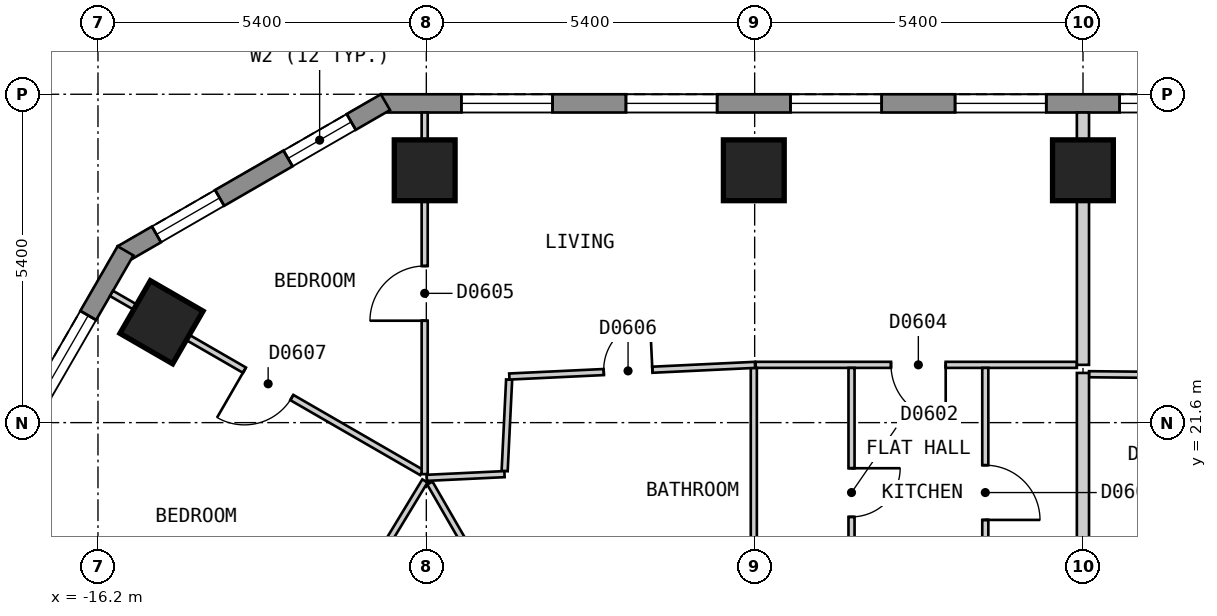
"""IFC4 building model, lengths in metres.
Left out: names, types, materials, properties, quantities, classifications, styles, units other than length and angle.
Written with IfcOpenShell. Run it as: python <this file> out.ifc"""

import sys

from ifc_helpers import new_model, si_unit, direction, frame, frame_2d, origin, origin_2d, place, context, subcontext, project, spatial, polyline, rectangle, outline, extrude, element, fill, save


model = new_model("IFC4")
c1 = context("Model", 3, precision=1e-05, world=origin(), true_north=direction((0.0, 1.0)))
c2 = subcontext(c1, "Body", "Model", "MODEL_VIEW")
j1 = project(units=[si_unit("LENGTHUNIT", "METRE"), si_unit("PLANEANGLEUNIT", "RADIAN")], contexts=[c1])
p1 = place(None, origin())
s1 = spatial("IfcSite", under=j1, at=p1, CompositionType="ELEMENT")
p2 = place(p1, origin())
s2 = spatial("IfcBuilding", under=s1, at=p2, CompositionType="ELEMENT")
p3 = place(p2, frame((0.0, 0.0, 81.0)))
s3 = spatial("IfcBuildingStorey", under=s2, at=p3, CompositionType="ELEMENT", Elevation=81.0)
for number, where, z_axis, x_axis in (
    (1, (-0.001, 25.75, 0.0), (0.0, 0.0, 1.0), (-1.0, 0.0, 0.0)),
    (2, (-5.414, 25.75, 0.0), (0.0, 0.0, 1.0), (-1.0, 0.0, 0.0)),
    (3, (-10.827, 25.75, 0.0), (0.0, 0.0, 1.0), (-1.0, 0.0, 0.0)),
    (4, (-15.155, 23.251, 0.0), (0.0, 0.0, 1.0), (-0.5, -0.866, 0.0)),
):
    element("IfcColumn", number, at=place(p3, frame(where, z_axis=z_axis, x_axis=x_axis)), inside=s3, PredefinedType="COLUMN", context=c2, shape_type="SweptSolid", body=[
        extrude(rectangle(XDim=1.0, YDim=1.0, at=origin_2d()), origin(), (0.0, 0.0, 1.0), 3.0),
    ])
p4 = place(p3, frame((11.547, 26.85, 0.0), z_axis=(0.0, 0.0, 1.0), x_axis=(-1.0, 0.0, 0.0)))
e5 = element("IfcWall", 5, at=p4, inside=s3, PredefinedType="SOLIDWALL", context=c2, shape_type="SweptSolid", body=[
    extrude(outline(polyline([(0.0, -0.15), (23.094, -0.15), (23.014, 0.15), (0.08, 0.15), (0.0, -0.15)])), origin(), (0.0, 0.0, 1.0), 2.7),
])
p5 = place(p4, frame((1.325, 0.0, 0.15)))
e6 = element("IfcOpeningElement", 6, at=p5, cuts=e5, PredefinedType="OPENING", context=c2, shape_type="SweptSolid", body=[
    extrude(rectangle(XDim=1.5, YDim=2.1, at=frame_2d((0.75, 1.05))), frame((0.0, 0.16, 0.0), z_axis=(0.0, -1.0, 0.0), x_axis=(1.0, 0.0, 0.0)), (0.0, 0.0, 1.0), 0.32),
])
p6 = place(p4, frame((4.032, 0.0, 0.15)))
e7 = element("IfcOpeningElement", 7, at=p6, cuts=e5, PredefinedType="OPENING", context=c2, shape_type="SweptSolid", body=[
    extrude(rectangle(XDim=1.5, YDim=2.1, at=frame_2d((0.75, 1.05))), frame((0.0, 0.16, 0.0), z_axis=(0.0, -1.0, 0.0), x_axis=(1.0, 0.0, 0.0)), (0.0, 0.0, 1.0), 0.32),
])
p7 = place(p4, frame((6.738, 0.0, 0.15)))
e8 = element("IfcOpeningElement", 8, at=p7, cuts=e5, PredefinedType="OPENING", context=c2, shape_type="SweptSolid", body=[
    extrude(rectangle(XDim=1.5, YDim=2.1, at=frame_2d((0.75, 1.05))), frame((0.0, 0.16, 0.0), z_axis=(0.0, -1.0, 0.0), x_axis=(1.0, 0.0, 0.0)), (0.0, 0.0, 1.0), 0.32),
])
p8 = place(p4, frame((9.445, 0.0, 0.15)))
e9 = element("IfcOpeningElement", 9, at=p8, cuts=e5, PredefinedType="OPENING", context=c2, shape_type="SweptSolid", body=[
    extrude(rectangle(XDim=1.5, YDim=2.1, at=frame_2d((0.75, 1.05))), frame((0.0, 0.16, 0.0), z_axis=(0.0, -1.0, 0.0), x_axis=(1.0, 0.0, 0.0)), (0.0, 0.0, 1.0), 0.32),
])
p9 = place(p4, frame((12.151, 0.0, 0.15)))
e10 = element("IfcOpeningElement", 10, at=p9, cuts=e5, PredefinedType="OPENING", context=c2, shape_type="SweptSolid", body=[
    extrude(rectangle(XDim=1.5, YDim=2.1, at=frame_2d((0.75, 1.05))), frame((0.0, 0.16, 0.0), z_axis=(0.0, -1.0, 0.0), x_axis=(1.0, 0.0, 0.0)), (0.0, 0.0, 1.0), 0.32),
])
p10 = place(p4, frame((14.858, 0.0, 0.15)))
e11 = element("IfcOpeningElement", 11, at=p10, cuts=e5, PredefinedType="OPENING", context=c2, shape_type="SweptSolid", body=[
    extrude(rectangle(XDim=1.5, YDim=2.1, at=frame_2d((0.75, 1.05))), frame((0.0, 0.16, 0.0), z_axis=(0.0, -1.0, 0.0), x_axis=(1.0, 0.0, 0.0)), (0.0, 0.0, 1.0), 0.32),
])
p11 = place(p4, frame((17.564, 0.0, 0.15)))
e12 = element("IfcOpeningElement", 12, at=p11, cuts=e5, PredefinedType="OPENING", context=c2, shape_type="SweptSolid", body=[
    extrude(rectangle(XDim=1.5, YDim=2.1, at=frame_2d((0.75, 1.05))), frame((0.0, 0.16, 0.0), z_axis=(0.0, -1.0, 0.0), x_axis=(1.0, 0.0, 0.0)), (0.0, 0.0, 1.0), 0.32),
])
p12 = place(p4, frame((20.271, 0.0, 0.15)))
e13 = element("IfcOpeningElement", 13, at=p12, cuts=e5, PredefinedType="OPENING", context=c2, shape_type="SweptSolid", body=[
    extrude(rectangle(XDim=1.5, YDim=2.1, at=frame_2d((0.75, 1.05))), frame((0.0, 0.16, 0.0), z_axis=(0.0, -1.0, 0.0), x_axis=(1.0, 0.0, 0.0)), (0.0, 0.0, 1.0), 0.32),
])
p13 = place(p3, frame((-11.472, 26.87, 0.0), z_axis=(0.0, 0.0, 1.0), x_axis=(-0.866022959057, -0.500004234368, 0.0)))
e14 = element("IfcWall", 14, at=p13, inside=s3, PredefinedType="SOLIDWALL", context=c2, shape_type="SweptSolid", body=[
    extrude(outline(polyline([(0.0, -0.15), (5.0, -0.15), (4.92, 0.15), (0.08, 0.15), (0.0, -0.15)])), origin(), (0.0, 0.0, 1.0), 2.7),
])
p14 = place(p13, frame((0.65, 0.0, 0.15)))
e15 = element("IfcOpeningElement", 15, at=p14, cuts=e14, PredefinedType="OPENING", context=c2, shape_type="SweptSolid", body=[
    extrude(rectangle(XDim=1.2, YDim=2.1, at=frame_2d((0.6, 1.05))), frame((0.0, 0.16, 0.0), z_axis=(0.0, -1.0, 0.0), x_axis=(1.0, 0.0, 0.0)), (0.0, 0.0, 1.0), 0.32),
])
p15 = place(p13, frame((3.149, 0.0, 0.15)))
e16 = element("IfcOpeningElement", 16, at=p15, cuts=e14, PredefinedType="OPENING", context=c2, shape_type="SweptSolid", body=[
    extrude(rectangle(XDim=1.2, YDim=2.1, at=frame_2d((0.6, 1.05))), frame((0.0, 0.16, 0.0), z_axis=(0.0, -1.0, 0.0), x_axis=(1.0, 0.0, 0.0)), (0.0, 0.0, 1.0), 0.32),
])
p16 = place(p3, frame((-15.747, 24.425, 0.0), z_axis=(0.0, 0.0, 1.0), x_axis=(-0.500027479704, -0.866009537788, 0.0)))
e17 = element("IfcWall", 17, at=p16, inside=s3, PredefinedType="SOLIDWALL", context=c2, shape_type="SweptSolid", body=[
    extrude(outline(polyline([(0.0, -0.15), (26.559, -0.15), (26.478, 0.15), (0.08, 0.15), (0.0, -0.15)])), origin(), (0.0, 0.0, 1.0), 2.7),
])
p17 = place(p16, frame((1.227, 0.0, 0.15)))
e18 = element("IfcOpeningElement", 18, at=p17, cuts=e17, PredefinedType="OPENING", context=c2, shape_type="SweptSolid", body=[
    extrude(rectangle(XDim=1.5, YDim=2.1, at=frame_2d((0.75, 1.05))), frame((0.0, 0.16, 0.0), z_axis=(0.0, -1.0, 0.0), x_axis=(1.0, 0.0, 0.0)), (0.0, 0.0, 1.0), 0.32),
])
p18 = place(p16, frame((3.739, 0.0, 0.15)))
e19 = element("IfcOpeningElement", 19, at=p18, cuts=e17, PredefinedType="OPENING", context=c2, shape_type="SweptSolid", body=[
    extrude(rectangle(XDim=1.5, YDim=2.1, at=frame_2d((0.75, 1.05))), frame((0.0, 0.16, 0.0), z_axis=(0.0, -1.0, 0.0), x_axis=(1.0, 0.0, 0.0)), (0.0, 0.0, 1.0), 0.32),
])
p19 = place(p16, frame((6.25, 0.0, 0.15)))
e20 = element("IfcOpeningElement", 20, at=p19, cuts=e17, PredefinedType="OPENING", context=c2, shape_type="SweptSolid", body=[
    extrude(rectangle(XDim=1.5, YDim=2.1, at=frame_2d((0.75, 1.05))), frame((0.0, 0.16, 0.0), z_axis=(0.0, -1.0, 0.0), x_axis=(1.0, 0.0, 0.0)), (0.0, 0.0, 1.0), 0.32),
])
p20 = place(p16, frame((8.761, 0.0, 0.15)))
e21 = element("IfcOpeningElement", 21, at=p20, cuts=e17, PredefinedType="OPENING", context=c2, shape_type="SweptSolid", body=[
    extrude(rectangle(XDim=1.5, YDim=2.1, at=frame_2d((0.75, 1.05))), frame((0.0, 0.16, 0.0), z_axis=(0.0, -1.0, 0.0), x_axis=(1.0, 0.0, 0.0)), (0.0, 0.0, 1.0), 0.32),
])
p21 = place(p16, frame((11.273, 0.0, 0.15)))
e22 = element("IfcOpeningElement", 22, at=p21, cuts=e17, PredefinedType="OPENING", context=c2, shape_type="SweptSolid", body=[
    extrude(rectangle(XDim=1.5, YDim=2.1, at=frame_2d((0.75, 1.05))), frame((0.0, 0.16, 0.0), z_axis=(0.0, -1.0, 0.0), x_axis=(1.0, 0.0, 0.0)), (0.0, 0.0, 1.0), 0.32),
])
p22 = place(p16, frame((13.785, 0.0, 0.15)))
e23 = element("IfcOpeningElement", 23, at=p22, cuts=e17, PredefinedType="OPENING", context=c2, shape_type="SweptSolid", body=[
    extrude(rectangle(XDim=1.5, YDim=2.1, at=frame_2d((0.75, 1.05))), frame((0.0, 0.16, 0.0), z_axis=(0.0, -1.0, 0.0), x_axis=(1.0, 0.0, 0.0)), (0.0, 0.0, 1.0), 0.32),
])
p23 = place(p16, frame((16.296, 0.0, 0.15)))
e24 = element("IfcOpeningElement", 24, at=p23, cuts=e17, PredefinedType="OPENING", context=c2, shape_type="SweptSolid", body=[
    extrude(rectangle(XDim=1.5, YDim=2.1, at=frame_2d((0.75, 1.05))), frame((0.0, 0.16, 0.0), z_axis=(0.0, -1.0, 0.0), x_axis=(1.0, 0.0, 0.0)), (0.0, 0.0, 1.0), 0.32),
])
p24 = place(p16, frame((18.807, 0.0, 0.15)))
e25 = element("IfcOpeningElement", 25, at=p24, cuts=e17, PredefinedType="OPENING", context=c2, shape_type="SweptSolid", body=[
    extrude(rectangle(XDim=1.5, YDim=2.1, at=frame_2d((0.75, 1.05))), frame((0.0, 0.16, 0.0), z_axis=(0.0, -1.0, 0.0), x_axis=(1.0, 0.0, 0.0)), (0.0, 0.0, 1.0), 0.32),
])
p25 = place(p16, frame((21.319, 0.0, 0.15)))
e26 = element("IfcOpeningElement", 26, at=p25, cuts=e17, PredefinedType="OPENING", context=c2, shape_type="SweptSolid", body=[
    extrude(rectangle(XDim=1.5, YDim=2.1, at=frame_2d((0.75, 1.05))), frame((0.0, 0.16, 0.0), z_axis=(0.0, -1.0, 0.0), x_axis=(1.0, 0.0, 0.0)), (0.0, 0.0, 1.0), 0.32),
])
p26 = place(p16, frame((23.831, 0.0, 0.15)))
e27 = element("IfcOpeningElement", 27, at=p26, cuts=e17, PredefinedType="OPENING", context=c2, shape_type="SweptSolid", body=[
    extrude(rectangle(XDim=1.5, YDim=2.1, at=frame_2d((0.75, 1.05))), frame((0.0, 0.16, 0.0), z_axis=(0.0, -1.0, 0.0), x_axis=(1.0, 0.0, 0.0)), (0.0, 0.0, 1.0), 0.32),
])
p27 = place(p3, frame((0.099, 22.396, 0.0), z_axis=(0.0, 0.0, 1.0), x_axis=(0.999952228611, -0.009774481889, 0.0)))
e28 = element("IfcWall", 28, at=p27, inside=s3, PredefinedType="PARTITIONING", context=c2, shape_type="SweptSolid", body=[
    extrude(rectangle(XDim=2.148, YDim=0.1, at=frame_2d((1.074, 0.0))), origin(), (0.0, 0.0, 1.0), 2.7),
])
p28 = place(p3, frame((-10.742, 20.606, 0.0), z_axis=(0.0, 0.0, 1.0), x_axis=(0.50003312339, -0.866006279142, 0.0)))
e29 = element("IfcWall", 29, at=p28, inside=s3, PredefinedType="PARTITIONING", context=c2, shape_type="SweptSolid", body=[
    extrude(rectangle(XDim=4.626, YDim=0.1, at=frame_2d((2.313, 0.0))), origin(), (0.0, 0.0, 1.0), 2.7),
])
p29 = place(p3, frame((-15.977, 23.725, 0.0), z_axis=(0.0, 0.0, 1.0), x_axis=(0.866028213039, -0.499995134196, 0.0)))
e30 = element("IfcWall", 30, at=p29, inside=s3, PredefinedType="PARTITIONING", context=c2, shape_type="SweptSolid", body=[
    extrude(rectangle(XDim=5.89, YDim=0.1, at=frame_2d((2.945, 0.0))), origin(), (0.0, 0.0, 1.0), 2.7),
])
p30 = place(p29, frame((2.524, 0.0, 0.0)))
e31 = element("IfcOpeningElement", 31, at=p30, cuts=e30, PredefinedType="OPENING", context=c2, shape_type="SweptSolid", body=[
    extrude(rectangle(XDim=0.9, YDim=2.1, at=frame_2d((0.45, 1.05))), frame((0.0, 0.06, 0.0), z_axis=(0.0, -1.0, 0.0), x_axis=(1.0, 0.0, 0.0)), (0.0, 0.0, 1.0), 0.12),
])
p31 = place(p3, frame((-5.384, 22.55, 0.0), z_axis=(0.0, 0.0, 1.0), x_axis=(1.0, 0.0, 0.0)))
e32 = element("IfcWall", 32, at=p31, inside=s3, PredefinedType="PARTITIONING", context=c2, shape_type="SweptSolid", body=[
    extrude(rectangle(XDim=5.283, YDim=0.1, at=frame_2d((2.642, 0.0))), origin(), (0.0, 0.0, 1.0), 2.7),
])
p32 = place(p31, frame((2.226, 0.0, 0.0)))
e33 = element("IfcOpeningElement", 33, at=p32, cuts=e32, PredefinedType="OPENING", context=c2, shape_type="SweptSolid", body=[
    extrude(rectangle(XDim=0.9, YDim=2.1, at=frame_2d((0.45, 1.05))), frame((0.0, 0.06, 0.0), z_axis=(0.0, -1.0, 0.0), x_axis=(1.0, 0.0, 0.0)), (0.0, 0.0, 1.0), 0.12),
])
p33 = place(p3, frame((-13.328, 16.511, 0.0), z_axis=(0.0, 0.0, 1.0), x_axis=(0.518570528669, 0.855034857065, 0.0)))
e34 = element("IfcWall", 34, at=p33, inside=s3, PredefinedType="PARTITIONING", context=c2, shape_type="SweptSolid", body=[
    extrude(rectangle(XDim=4.83, YDim=0.1, at=frame_2d((2.415, 0.0))), origin(), (0.0, 0.0, 1.0), 2.7),
])
p34 = place(p33, frame((1.995, 0.0, 0.0)))
e35 = element("IfcOpeningElement", 35, at=p34, cuts=e34, PredefinedType="OPENING", context=c2, shape_type="SweptSolid", body=[
    extrude(rectangle(XDim=0.8, YDim=2.1, at=frame_2d((0.4, 1.05))), frame((0.0, 0.06, 0.0), z_axis=(0.0, -1.0, 0.0), x_axis=(1.0, 0.0, 0.0)), (0.0, 0.0, 1.0), 0.12),
])
p35 = place(p3, frame((-9.512, 20.803, 0.0), z_axis=(0.0, 0.0, 1.0), x_axis=(0.049089165168, 0.998794400196, 0.0)))
e36 = element("IfcWall", 36, at=p35, inside=s3, PredefinedType="PARTITIONING", context=c2, shape_type="SweptSolid", body=[
    extrude(rectangle(XDim=1.507, YDim=0.1, at=frame_2d((0.753, 0.0))), origin(), (0.0, 0.0, 1.0), 2.7),
])
p36 = place(p3, frame((-3.807, 18.45, 0.0), z_axis=(0.0, 0.0, 1.0), x_axis=(0.0, 1.0, 0.0)))
e37 = element("IfcWall", 37, at=p36, inside=s3, PredefinedType="PARTITIONING", context=c2, shape_type="SweptSolid", body=[
    extrude(rectangle(XDim=4.05, YDim=0.1, at=frame_2d((2.025, 0.0))), origin(), (0.0, 0.0, 1.0), 2.7),
])
p37 = place(p36, frame((1.6, 0.0, 0.0)))
e38 = element("IfcOpeningElement", 38, at=p37, cuts=e37, PredefinedType="OPENING", context=c2, shape_type="SweptSolid", body=[
    extrude(rectangle(XDim=0.8, YDim=2.1, at=frame_2d((0.4, 1.05))), frame((0.0, 0.06, 0.0), z_axis=(0.0, -1.0, 0.0), x_axis=(1.0, 0.0, 0.0)), (0.0, 0.0, 1.0), 0.12),
])
p38 = place(p3, frame((-5.414, 18.35, 0.0), z_axis=(0.0, 0.0, 1.0), x_axis=(0.0, 1.0, 0.0)))
e39 = element("IfcWall", 39, at=p38, inside=s3, PredefinedType="PARTITIONING", context=c2, shape_type="SweptSolid", body=[
    extrude(rectangle(XDim=4.15, YDim=0.1, at=frame_2d((2.075, 0.0))), origin(), (0.0, 0.0, 1.0), 2.7),
])
p39 = place(p3, frame((-10.827, 20.753, 0.0), z_axis=(0.0, 0.0, 1.0), x_axis=(0.0, 1.0, 0.0)))
e40 = element("IfcWall", 40, at=p39, inside=s3, PredefinedType="PARTITIONING", context=c2, shape_type="SweptSolid", body=[
    extrude(rectangle(XDim=5.947, YDim=0.1, at=frame_2d((2.974, 0.0))), origin(), (0.0, 0.0, 1.0), 2.7),
])
p40 = place(p39, frame((2.523, 0.0, 0.0)))
e41 = element("IfcOpeningElement", 41, at=p40, cuts=e40, PredefinedType="OPENING", context=c2, shape_type="SweptSolid", body=[
    extrude(rectangle(XDim=0.9, YDim=2.1, at=frame_2d((0.45, 1.05))), frame((0.0, 0.06, 0.0), z_axis=(0.0, -1.0, 0.0), x_axis=(1.0, 0.0, 0.0)), (0.0, 0.0, 1.0), 0.12),
])
p41 = place(p3, frame((-1.607, 18.45, 0.0), z_axis=(0.0, 0.0, 1.0), x_axis=(0.0, 1.0, 0.0)))
e42 = element("IfcWall", 42, at=p41, inside=s3, PredefinedType="PARTITIONING", context=c2, shape_type="SweptSolid", body=[
    extrude(rectangle(XDim=4.05, YDim=0.1, at=frame_2d((2.025, 0.0))), origin(), (0.0, 0.0, 1.0), 2.7),
])
p42 = place(p41, frame((1.55, 0.0, 0.0)))
e43 = element("IfcOpeningElement", 43, at=p42, cuts=e42, PredefinedType="OPENING", context=c2, shape_type="SweptSolid", body=[
    extrude(rectangle(XDim=0.9, YDim=2.1, at=frame_2d((0.45, 1.05))), frame((0.0, 0.06, 0.0), z_axis=(0.0, -1.0, 0.0), x_axis=(1.0, 0.0, 0.0)), (0.0, 0.0, 1.0), 0.12),
])
p43 = place(p3, frame((-10.792, 20.692, 0.0), z_axis=(0.0, 0.0, 1.0), x_axis=(0.998861653202, 0.04770112957, 0.0)))
e44 = element("IfcWall", 44, at=p43, inside=s3, PredefinedType="PARTITIONING", context=c2, shape_type="SweptSolid", body=[
    extrude(rectangle(XDim=1.28, YDim=0.1, at=frame_2d((0.64, 0.0))), origin(), (0.0, 0.0, 1.0), 2.7),
])
p44 = place(p3, frame((-9.435, 22.358, 0.0), z_axis=(0.0, 0.0, 1.0), x_axis=(0.998871548472, 0.04749346959, 0.0)))
e45 = element("IfcWall", 45, at=p44, inside=s3, PredefinedType="PARTITIONING", context=c2, shape_type="SweptSolid", body=[
    extrude(rectangle(XDim=4.046, YDim=0.1, at=frame_2d((2.023, 0.0))), origin(), (0.0, 0.0, 1.0), 2.7),
])
p45 = place(p44, frame((1.555, 0.0, 0.0)))
e46 = element("IfcOpeningElement", 46, at=p45, cuts=e45, PredefinedType="OPENING", context=c2, shape_type="SweptSolid", body=[
    extrude(rectangle(XDim=0.8, YDim=2.1, at=frame_2d((0.4, 1.05))), frame((0.0, 0.06, 0.0), z_axis=(0.0, -1.0, 0.0), x_axis=(1.0, 0.0, 0.0)), (0.0, 0.0, 1.0), 0.12),
])
p46 = place(p3, frame((-0.001, 18.45, 0.0), z_axis=(0.0, 0.0, 1.0), x_axis=(0.0, 1.0, 0.0)))
e47 = element("IfcWall", 47, at=p46, inside=s3, PredefinedType="PARTITIONING", context=c2, shape_type="SweptSolid", body=[
    extrude(rectangle(XDim=3.967, YDim=0.2, at=frame_2d((1.983, 0.0))), origin(), (0.0, 0.0, 1.0), 2.7),
])
p47 = place(p3, frame((-0.001, 22.55, 0.0), z_axis=(0.0, 0.0, 1.0), x_axis=(0.0, 1.0, 0.0)))
e48 = element("IfcWall", 48, at=p47, inside=s3, PredefinedType="PARTITIONING", context=c2, shape_type="SweptSolid", body=[
    extrude(rectangle(XDim=4.15, YDim=0.2, at=frame_2d((2.075, 0.0))), origin(), (0.0, 0.0, 1.0), 2.7),
])
p48 = place(p8, origin())
e49 = element("IfcWindow", 49, at=p48, inside=s3, PartitioningType="SINGLE_PANEL", PredefinedType="WINDOW", context=c2, shape_type="SweptSolid", body=[
    extrude(rectangle(XDim=1.5, YDim=2.1, at=frame_2d((0.75, 1.05))), frame((0.0, 0.03, 0.0), z_axis=(0.0, -1.0, 0.0), x_axis=(1.0, 0.0, 0.0)), (0.0, 0.0, 1.0), 0.06),
])
fill(e9, e49)
p49 = place(p9, origin())
e50 = element("IfcWindow", 50, at=p49, inside=s3, PartitioningType="SINGLE_PANEL", PredefinedType="WINDOW", context=c2, shape_type="SweptSolid", body=[
    extrude(rectangle(XDim=1.5, YDim=2.1, at=frame_2d((0.75, 1.05))), frame((0.0, 0.03, 0.0), z_axis=(0.0, -1.0, 0.0), x_axis=(1.0, 0.0, 0.0)), (0.0, 0.0, 1.0), 0.06),
])
fill(e10, e50)
p50 = place(p10, origin())
e51 = element("IfcWindow", 51, at=p50, inside=s3, PartitioningType="SINGLE_PANEL", PredefinedType="WINDOW", context=c2, shape_type="SweptSolid", body=[
    extrude(rectangle(XDim=1.5, YDim=2.1, at=frame_2d((0.75, 1.05))), frame((0.0, 0.03, 0.0), z_axis=(0.0, -1.0, 0.0), x_axis=(1.0, 0.0, 0.0)), (0.0, 0.0, 1.0), 0.06),
])
fill(e11, e51)
p51 = place(p11, origin())
e52 = element("IfcWindow", 52, at=p51, inside=s3, PartitioningType="SINGLE_PANEL", PredefinedType="WINDOW", context=c2, shape_type="SweptSolid", body=[
    extrude(rectangle(XDim=1.5, YDim=2.1, at=frame_2d((0.75, 1.05))), frame((0.0, 0.03, 0.0), z_axis=(0.0, -1.0, 0.0), x_axis=(1.0, 0.0, 0.0)), (0.0, 0.0, 1.0), 0.06),
])
fill(e12, e52)
p52 = place(p12, origin())
e53 = element("IfcWindow", 53, at=p52, inside=s3, PartitioningType="SINGLE_PANEL", PredefinedType="WINDOW", context=c2, shape_type="SweptSolid", body=[
    extrude(rectangle(XDim=1.5, YDim=2.1, at=frame_2d((0.75, 1.05))), frame((0.0, 0.03, 0.0), z_axis=(0.0, -1.0, 0.0), x_axis=(1.0, 0.0, 0.0)), (0.0, 0.0, 1.0), 0.06),
])
fill(e13, e53)
p53 = place(p14, origin())
e54 = element("IfcWindow", 54, at=p53, inside=s3, PartitioningType="SINGLE_PANEL", PredefinedType="WINDOW", context=c2, shape_type="SweptSolid", body=[
    extrude(rectangle(XDim=1.2, YDim=2.1, at=frame_2d((0.6, 1.05))), frame((0.0, 0.03, 0.0), z_axis=(0.0, -1.0, 0.0), x_axis=(1.0, 0.0, 0.0)), (0.0, 0.0, 1.0), 0.06),
])
fill(e15, e54)
p54 = place(p15, origin())
e55 = element("IfcWindow", 55, at=p54, inside=s3, PartitioningType="SINGLE_PANEL", PredefinedType="WINDOW", context=c2, shape_type="SweptSolid", body=[
    extrude(rectangle(XDim=1.2, YDim=2.1, at=frame_2d((0.6, 1.05))), frame((0.0, 0.03, 0.0), z_axis=(0.0, -1.0, 0.0), x_axis=(1.0, 0.0, 0.0)), (0.0, 0.0, 1.0), 0.06),
])
fill(e16, e55)
p55 = place(p17, origin())
e56 = element("IfcWindow", 56, at=p55, inside=s3, PartitioningType="SINGLE_PANEL", PredefinedType="WINDOW", context=c2, shape_type="SweptSolid", body=[
    extrude(rectangle(XDim=1.5, YDim=2.1, at=frame_2d((0.75, 1.05))), frame((0.0, 0.03, 0.0), z_axis=(0.0, -1.0, 0.0), x_axis=(1.0, 0.0, 0.0)), (0.0, 0.0, 1.0), 0.06),
])
fill(e18, e56)
p56 = place(p37, origin())
e57 = element("IfcDoor", 57, at=p56, inside=s3, OperationType="SINGLE_SWING_RIGHT", PredefinedType="DOOR", context=c2, shape_type="SweptSolid", body=[
    extrude(rectangle(XDim=0.8, YDim=2.1, at=frame_2d((0.4, 1.05))), frame((0.0, 0.025, 0.0), z_axis=(0.0, -1.0, 0.0), x_axis=(1.0, 0.0, 0.0)), (0.0, 0.0, 1.0), 0.05),
])
fill(e38, e57)
p57 = place(p42, origin())
e58 = element("IfcDoor", 58, at=p57, inside=s3, OperationType="SINGLE_SWING_LEFT", PredefinedType="DOOR", context=c2, shape_type="SweptSolid", body=[
    extrude(rectangle(XDim=0.9, YDim=2.1, at=frame_2d((0.45, 1.05))), frame((0.0, 0.025, 0.0), z_axis=(0.0, -1.0, 0.0), x_axis=(1.0, 0.0, 0.0)), (0.0, 0.0, 1.0), 0.05),
])
fill(e43, e58)
p58 = place(p32, origin())
e59 = element("IfcDoor", 59, at=p58, inside=s3, OperationType="SINGLE_SWING_RIGHT", PredefinedType="DOOR", context=c2, shape_type="SweptSolid", body=[
    extrude(rectangle(XDim=0.9, YDim=2.1, at=frame_2d((0.45, 1.05))), frame((0.0, 0.025, 0.0), z_axis=(0.0, -1.0, 0.0), x_axis=(1.0, 0.0, 0.0)), (0.0, 0.0, 1.0), 0.05),
])
fill(e33, e59)
p59 = place(p40, origin())
e60 = element("IfcDoor", 60, at=p59, inside=s3, OperationType="SINGLE_SWING_LEFT", PredefinedType="DOOR", context=c2, shape_type="SweptSolid", body=[
    extrude(rectangle(XDim=0.9, YDim=2.1, at=frame_2d((0.45, 1.05))), frame((0.0, 0.025, 0.0), z_axis=(0.0, -1.0, 0.0), x_axis=(1.0, 0.0, 0.0)), (0.0, 0.0, 1.0), 0.05),
])
fill(e41, e60)
p60 = place(p45, origin())
e61 = element("IfcDoor", 61, at=p60, inside=s3, OperationType="SINGLE_SWING_RIGHT", PredefinedType="DOOR", context=c2, shape_type="SweptSolid", body=[
    extrude(rectangle(XDim=0.8, YDim=2.1, at=frame_2d((0.4, 1.05))), frame((0.0, 0.025, 0.0), z_axis=(0.0, -1.0, 0.0), x_axis=(1.0, 0.0, 0.0)), (0.0, 0.0, 1.0), 0.05),
])
fill(e46, e61)
p61 = place(p30, origin())
e62 = element("IfcDoor", 62, at=p61, inside=s3, OperationType="SINGLE_SWING_LEFT", PredefinedType="DOOR", context=c2, shape_type="SweptSolid", body=[
    extrude(rectangle(XDim=0.9, YDim=2.1, at=frame_2d((0.45, 1.05))), frame((0.0, 0.025, 0.0), z_axis=(0.0, -1.0, 0.0), x_axis=(1.0, 0.0, 0.0)), (0.0, 0.0, 1.0), 0.05),
])
fill(e31, e62)
save(model, sys.argv[1])
